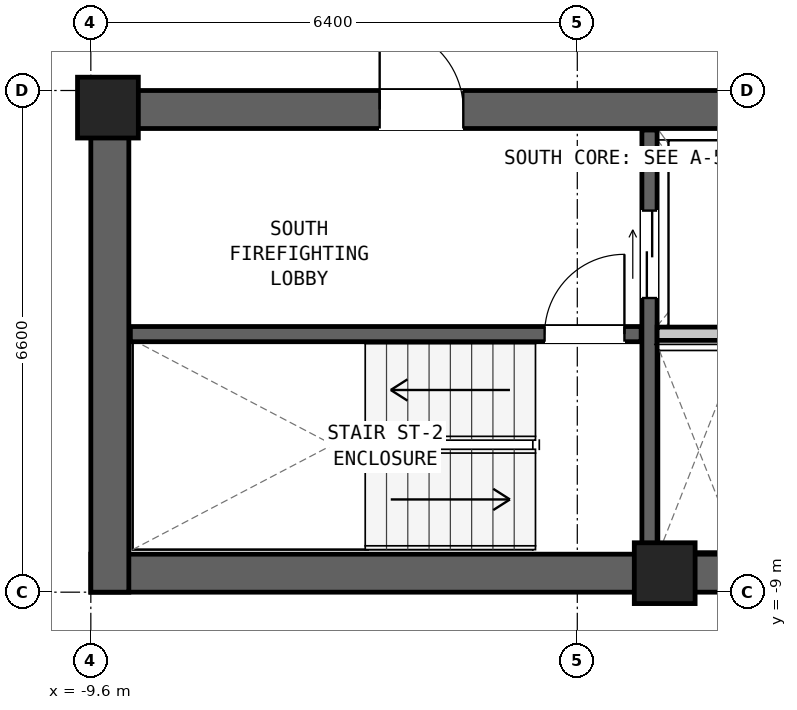
"""IFC4 building model, lengths in metres.
Left out: names, types, materials, properties, quantities, classifications, styles, units other than length and angle.
Written with IfcOpenShell. Run it as: python <this file> out.ifc"""

import sys

from ifc_helpers import new_model, si_unit, direction, frame, frame_2d, origin, origin_2d, place, context, subcontext, project, spatial, rectangle, extrude, element, fill, save


model = new_model("IFC4")
c1 = context("Model", 3, precision=1e-05, world=origin(), true_north=direction((0.0, 1.0)))
c2 = subcontext(c1, "Body", "Model", "MODEL_VIEW")
j1 = project(units=[si_unit("LENGTHUNIT", "METRE"), si_unit("PLANEANGLEUNIT", "RADIAN")], contexts=[c1])
p1 = place(None, origin())
s1 = spatial("IfcSite", under=j1, at=p1, CompositionType="ELEMENT")
p2 = place(p1, origin())
s2 = spatial("IfcBuilding", under=s1, at=p2, CompositionType="ELEMENT")
p3 = place(p2, frame((0.0, 0.0, 174.45)))
s3 = spatial("IfcBuildingStorey", under=s2, at=p3, CompositionType="ELEMENT", Elevation=174.45)
p4 = place(p3, frame((-9.6, -8.75, 0.0), z_axis=(0.0, 0.0, 1.0), x_axis=(1.0, 0.0, 0.0)))
e1 = element("IfcWall", 1, at=p4, inside=s3, PredefinedType="SHEAR", context=c2, shape_type="SweptSolid", body=[
    extrude(rectangle(XDim=19.2, YDim=0.5, at=frame_2d((9.6, 0.0))), origin(), (0.0, 0.0, 1.0), 3.05),
])
p5 = place(p3, frame((-9.6, -2.65, 0.0), z_axis=(0.0, 0.0, 1.0), x_axis=(1.0, 0.0, 0.0)))
e2 = element("IfcWall", 2, at=p5, inside=s3, PredefinedType="SHEAR", context=c2, shape_type="SweptSolid", body=[
    extrude(rectangle(XDim=19.2, YDim=0.5, at=frame_2d((9.6, 0.0))), origin(), (0.0, 0.0, 1.0), 3.05),
])
p6 = place(p5, frame((3.8, 0.0, 0.0)))
e3 = element("IfcOpeningElement", 3, at=p6, cuts=e2, PredefinedType="OPENING", context=c2, shape_type="SweptSolid", body=[
    extrude(rectangle(XDim=1.1, YDim=2.08, at=frame_2d((0.55, 1.04))), frame((0.0, 0.262, 0.0), z_axis=(0.0, -1.0, 0.0), x_axis=(1.0, 0.0, 0.0)), (0.0, 0.0, 1.0), 0.524),
])
p7 = place(p5, frame((12.2, 0.0, 0.0)))
e4 = element("IfcOpeningElement", 4, at=p7, cuts=e2, PredefinedType="OPENING", context=c2, shape_type="SweptSolid", body=[
    extrude(rectangle(XDim=1.6, YDim=2.12, at=frame_2d((0.8, 1.06))), frame((0.0, 0.262, 0.0), z_axis=(0.0, -1.0, 0.0), x_axis=(1.0, 0.0, 0.0)), (0.0, 0.0, 1.0), 0.524),
])
p8 = place(p5, frame((16.5, 0.0, 0.0)))
e5 = element("IfcOpeningElement", 5, at=p8, cuts=e2, PredefinedType="OPENING", context=c2, shape_type="SweptSolid", body=[
    extrude(rectangle(XDim=0.9, YDim=2.05, at=frame_2d((0.45, 1.025))), frame((0.0, 0.262, 0.0), z_axis=(0.0, -1.0, 0.0), x_axis=(1.0, 0.0, 0.0)), (0.0, 0.0, 1.0), 0.524),
])
p9 = place(p3, frame((-9.35, -9.0, 0.0), z_axis=(0.0, 0.0, 1.0), x_axis=(0.0, 1.0, 0.0)))
e6 = element("IfcWall", 6, at=p9, inside=s3, PredefinedType="SHEAR", context=c2, shape_type="SweptSolid", body=[
    extrude(rectangle(XDim=6.6, YDim=0.5, at=frame_2d((3.3, 0.0))), origin(), (0.0, 0.0, 1.0), 3.05),
])
for number, where, z_axis, x_axis in (
    (7, (-9.375, -2.625, 0.0), (0.0, 0.0, 1.0), (1.0, 0.0, 0.0)),
    (8, (-2.05, -8.75, 0.0), (0.0, 0.0, 1.0), (1.0, 0.0, 0.0)),
):
    element("IfcColumn", number, at=place(p3, frame(where, z_axis=z_axis, x_axis=x_axis)), inside=s3, PredefinedType="COLUMN", context=c2, shape_type="SweptSolid", body=[
        extrude(rectangle(XDim=0.8, YDim=0.8, at=origin_2d()), origin(), (0.0, 0.0, 1.0), 3.05),
    ])
p10 = place(p3, frame((-9.08, -5.605, 0.0), z_axis=(0.0, 0.0, 1.0), x_axis=(1.0, 0.0, 0.0)))
e9 = element("IfcWall", 9, at=p10, inside=s3, PredefinedType="SHEAR", context=c2, shape_type="SweptSolid", body=[
    extrude(rectangle(XDim=6.72, YDim=0.2, at=frame_2d((3.36, 0.0))), origin(), (0.0, 0.0, 1.0), 2.83),
])
p11 = place(p10, frame((5.45, 0.0, 0.0)))
e10 = element("IfcOpeningElement", 10, at=p11, cuts=e9, PredefinedType="OPENING", context=c2, shape_type="SweptSolid", body=[
    extrude(rectangle(XDim=1.05, YDim=2.08, at=frame_2d((0.525, 1.04))), frame((0.0, 0.112, 0.0), z_axis=(0.0, -1.0, 0.0), x_axis=(1.0, 0.0, 0.0)), (0.0, 0.0, 1.0), 0.224),
])
p12 = place(p3, frame((-2.25, -8.48, 0.0), z_axis=(0.0, 0.0, 1.0), x_axis=(0.0, 1.0, 0.0)))
e11 = element("IfcWall", 11, at=p12, inside=s3, PredefinedType="SHEAR", context=c2, shape_type="SweptSolid", body=[
    extrude(rectangle(XDim=5.56, YDim=0.2, at=frame_2d((2.78, 0.0))), origin(), (0.0, 0.0, 1.0), 2.83),
])
p13 = place(p12, frame((3.35, 0.0, 0.0)))
e12 = element("IfcOpeningElement", 12, at=p13, cuts=e11, PredefinedType="OPENING", context=c2, shape_type="SweptSolid", body=[
    extrude(rectangle(XDim=1.15, YDim=2.08, at=frame_2d((0.575, 1.04))), frame((0.0, 0.112, 0.0), z_axis=(0.0, -1.0, 0.0), x_axis=(1.0, 0.0, 0.0)), (0.0, 0.0, 1.0), 0.224),
])
p14 = place(p3, frame((-2.15, -5.6, 0.0), z_axis=(0.0, 0.0, 1.0), x_axis=(1.0, 0.0, 0.0)))
e13 = element("IfcWall", 13, at=p14, inside=s3, PredefinedType="PARTITIONING", context=c2, shape_type="SweptSolid", body=[
    extrude(rectangle(XDim=1.97, YDim=0.175, at=frame_2d((0.985, 0.0))), origin(), (0.0, 0.0, 1.0), 2.83),
])
p15 = place(p11, origin())
e14 = element("IfcDoor", 14, at=p15, inside=s3, OperationType="SINGLE_SWING_RIGHT", PredefinedType="DOOR", context=c2, shape_type="SweptSolid", body=[
    extrude(rectangle(XDim=1.05, YDim=2.08, at=frame_2d((0.525, 1.04))), frame((0.0, 0.025, 0.0), z_axis=(0.0, -1.0, 0.0), x_axis=(1.0, 0.0, 0.0)), (0.0, 0.0, 1.0), 0.05),
])
fill(e10, e14)
p16 = place(p6, origin())
e15 = element("IfcDoor", 15, at=p16, inside=s3, OperationType="SINGLE_SWING_LEFT", PredefinedType="DOOR", context=c2, shape_type="SweptSolid", body=[
    extrude(rectangle(XDim=1.1, YDim=2.08, at=frame_2d((0.55, 1.04))), frame((0.0, 0.025, 0.0), z_axis=(0.0, -1.0, 0.0), x_axis=(1.0, 0.0, 0.0)), (0.0, 0.0, 1.0), 0.05),
])
fill(e3, e15)
p17 = place(p13, origin())
e16 = element("IfcDoor", 16, at=p17, inside=s3, OperationType="DOUBLE_DOOR_SLIDING", PredefinedType="DOOR", context=c2, shape_type="SweptSolid", body=[
    extrude(rectangle(XDim=1.15, YDim=2.08, at=frame_2d((0.575, 1.04))), frame((0.0, 0.025, 0.0), z_axis=(0.0, -1.0, 0.0), x_axis=(1.0, 0.0, 0.0)), (0.0, 0.0, 1.0), 0.05),
])
fill(e12, e16)
save(model, sys.argv[1])
